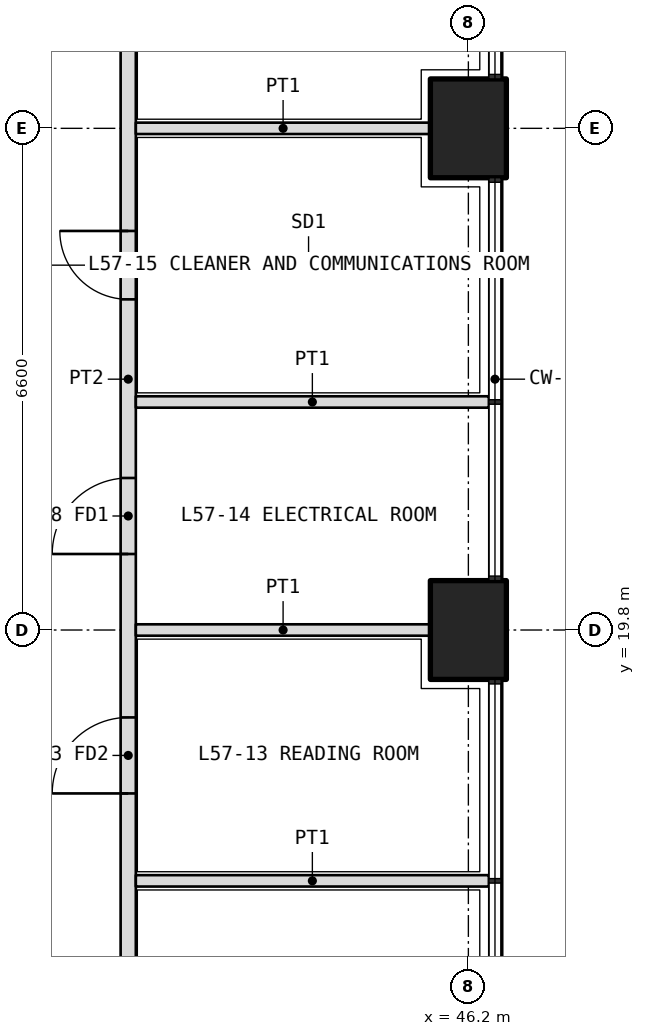
"""IFC4 building model, lengths in metres.
Left out: names, types, materials, properties, quantities, classifications, styles, units other than length and angle.
Written with IfcOpenShell. Run it as: python <this file> out.ifc"""

import sys

from ifc_helpers import new_model, si_unit, direction, frame, frame_2d, origin, origin_2d, place, context, subcontext, project, spatial, rectangle, extrude, element, fill, save


model = new_model("IFC4")
c1 = context("Model", 3, precision=1e-05, world=origin(), true_north=direction((0.0, 1.0)))
c2 = subcontext(c1, "Body", "Model", "MODEL_VIEW")
j1 = project(units=[si_unit("LENGTHUNIT", "METRE"), si_unit("PLANEANGLEUNIT", "RADIAN")], contexts=[c1])
p1 = place(None, origin())
s1 = spatial("IfcSite", under=j1, at=p1, CompositionType="ELEMENT")
p2 = place(p1, origin())
s2 = spatial("IfcBuilding", under=s1, at=p2, CompositionType="ELEMENT")
p3 = place(p2, frame((0.0, 0.0, 250.2)))
s3 = spatial("IfcBuildingStorey", under=s2, at=p3, CompositionType="ELEMENT", Elevation=250.2)
for number, where, z_axis, x_axis in (
    (1, (46.2, 19.8, 0.0), (0.0, 0.0, 1.0), (0.0, 1.0, 0.0)),
    (2, (46.2, 26.4, 0.0), (0.0, 0.0, 1.0), (0.0, 1.0, 0.0)),
):
    element("IfcColumn", number, at=place(p3, frame(where, z_axis=z_axis, x_axis=x_axis)), inside=s3, PredefinedType="COLUMN", context=c2, shape_type="SweptSolid", body=[
        extrude(rectangle(XDim=1.3, YDim=1.0, at=origin_2d()), origin(), (0.0, 0.0, 1.0), 4.2),
    ])
p4 = place(p3, frame((41.725, 7.4, 0.0), z_axis=(0.0, 0.0, 1.0), x_axis=(0.0, 1.0, 0.0)))
e3 = element("IfcWall", 3, at=p4, inside=s3, PredefinedType="PARTITIONING", context=c2, shape_type="SweptSolid", body=[
    extrude(rectangle(XDim=31.4, YDim=0.2, at=frame_2d((15.7, 0.0))), origin(), (0.0, 0.0, 1.0), 3.0),
])
p5 = place(p4, frame((4.0, 0.0, 0.0)))
e4 = element("IfcOpeningElement", 4, at=p5, cuts=e3, PredefinedType="OPENING", context=c2, shape_type="SweptSolid", body=[
    extrude(rectangle(XDim=1.0, YDim=2.1, at=frame_2d((0.5, 1.05))), frame((0.0, 0.11, 0.0), z_axis=(0.0, -1.0, 0.0), x_axis=(1.0, 0.0, 0.0)), (0.0, 0.0, 1.0), 0.22),
])
p6 = place(p4, frame((10.25, 0.0, 0.0)))
e5 = element("IfcOpeningElement", 5, at=p6, cuts=e3, PredefinedType="OPENING", context=c2, shape_type="SweptSolid", body=[
    extrude(rectangle(XDim=1.0, YDim=2.1, at=frame_2d((0.5, 1.05))), frame((0.0, 0.11, 0.0), z_axis=(0.0, -1.0, 0.0), x_axis=(1.0, 0.0, 0.0)), (0.0, 0.0, 1.0), 0.22),
])
p7 = place(p4, frame((13.4, 0.0, 0.0)))
e6 = element("IfcOpeningElement", 6, at=p7, cuts=e3, PredefinedType="OPENING", context=c2, shape_type="SweptSolid", body=[
    extrude(rectangle(XDim=1.0, YDim=2.1, at=frame_2d((0.5, 1.05))), frame((0.0, 0.11, 0.0), z_axis=(0.0, -1.0, 0.0), x_axis=(1.0, 0.0, 0.0)), (0.0, 0.0, 1.0), 0.22),
])
p8 = place(p4, frame((16.75, 0.0, 0.0)))
e7 = element("IfcOpeningElement", 7, at=p8, cuts=e3, PredefinedType="OPENING", context=c2, shape_type="SweptSolid", body=[
    extrude(rectangle(XDim=0.9, YDim=2.1, at=frame_2d((0.45, 1.05))), frame((0.0, 0.11, 0.0), z_axis=(0.0, -1.0, 0.0), x_axis=(1.0, 0.0, 0.0)), (0.0, 0.0, 1.0), 0.22),
])
p9 = place(p4, frame((20.05, 0.0, 0.0)))
e8 = element("IfcOpeningElement", 8, at=p9, cuts=e3, PredefinedType="OPENING", context=c2, shape_type="SweptSolid", body=[
    extrude(rectangle(XDim=1.2, YDim=2.1, at=frame_2d((0.6, 1.05))), frame((0.0, 0.11, 0.0), z_axis=(0.0, -1.0, 0.0), x_axis=(1.0, 0.0, 0.0)), (0.0, 0.0, 1.0), 0.22),
])
p10 = place(p4, frame((26.3, 0.0, 0.0)))
e9 = element("IfcOpeningElement", 9, at=p10, cuts=e3, PredefinedType="OPENING", context=c2, shape_type="SweptSolid", body=[
    extrude(rectangle(XDim=1.2, YDim=2.1, at=frame_2d((0.6, 1.05))), frame((0.0, 0.11, 0.0), z_axis=(0.0, -1.0, 0.0), x_axis=(1.0, 0.0, 0.0)), (0.0, 0.0, 1.0), 0.22),
])
p11 = place(p3, frame((46.47, 22.8, 0.0), z_axis=(0.0, 0.0, 1.0), x_axis=(-1.0, 0.0, 0.0)))
e10 = element("IfcWall", 10, at=p11, inside=s3, PredefinedType="PARTITIONING", context=c2, shape_type="SweptSolid", body=[
    extrude(rectangle(XDim=4.645, YDim=0.15, at=frame_2d((2.323, 0.0))), origin(), (0.0, 0.0, 1.0), 2.7),
])
p12 = place(p3, frame((45.7, 26.4, 0.0), z_axis=(0.0, 0.0, 1.0), x_axis=(-1.0, 0.0, 0.0)))
e11 = element("IfcWall", 11, at=p12, inside=s3, PredefinedType="PARTITIONING", context=c2, shape_type="SweptSolid", body=[
    extrude(rectangle(XDim=3.875, YDim=0.15, at=frame_2d((1.938, 0.0))), origin(), (0.0, 0.0, 1.0), 3.0),
])
p13 = place(p3, frame((46.47, 16.5, 0.0), z_axis=(0.0, 0.0, 1.0), x_axis=(-1.0, 0.0, 0.0)))
e12 = element("IfcWall", 12, at=p13, inside=s3, PredefinedType="PARTITIONING", context=c2, shape_type="SweptSolid", body=[
    extrude(rectangle(XDim=4.645, YDim=0.15, at=frame_2d((2.323, 0.0))), origin(), (0.0, 0.0, 1.0), 2.7),
])
p14 = place(p3, frame((45.7, 19.8, 0.0), z_axis=(0.0, 0.0, 1.0), x_axis=(-1.0, 0.0, 0.0)))
e13 = element("IfcWall", 13, at=p14, inside=s3, PredefinedType="PARTITIONING", context=c2, shape_type="SweptSolid", body=[
    extrude(rectangle(XDim=3.875, YDim=0.15, at=frame_2d((1.938, 0.0))), origin(), (0.0, 0.0, 1.0), 3.0),
])
p15 = place(p6, origin())
e14 = element("IfcDoor", 14, at=p15, inside=s3, OperationType="SINGLE_SWING_LEFT", PredefinedType="DOOR", context=c2, shape_type="SweptSolid", body=[
    extrude(rectangle(XDim=1.0, YDim=2.1, at=frame_2d((0.5, 1.05))), frame((0.0, 0.025, 0.0), z_axis=(0.0, -1.0, 0.0), x_axis=(1.0, 0.0, 0.0)), (0.0, 0.0, 1.0), 0.05),
])
fill(e5, e14)
p16 = place(p7, origin())
e15 = element("IfcDoor", 15, at=p16, inside=s3, OperationType="SINGLE_SWING_LEFT", PredefinedType="DOOR", context=c2, shape_type="SweptSolid", body=[
    extrude(rectangle(XDim=1.0, YDim=2.1, at=frame_2d((0.5, 1.05))), frame((0.0, 0.025, 0.0), z_axis=(0.0, -1.0, 0.0), x_axis=(1.0, 0.0, 0.0)), (0.0, 0.0, 1.0), 0.05),
])
fill(e6, e15)
p17 = place(p8, origin())
e16 = element("IfcDoor", 16, at=p17, inside=s3, OperationType="SINGLE_SWING_RIGHT", PredefinedType="DOOR", context=c2, shape_type="SweptSolid", body=[
    extrude(rectangle(XDim=0.9, YDim=2.1, at=frame_2d((0.45, 1.05))), frame((0.0, 0.025, 0.0), z_axis=(0.0, -1.0, 0.0), x_axis=(1.0, 0.0, 0.0)), (0.0, 0.0, 1.0), 0.05),
])
fill(e7, e16)
save(model, sys.argv[1])
